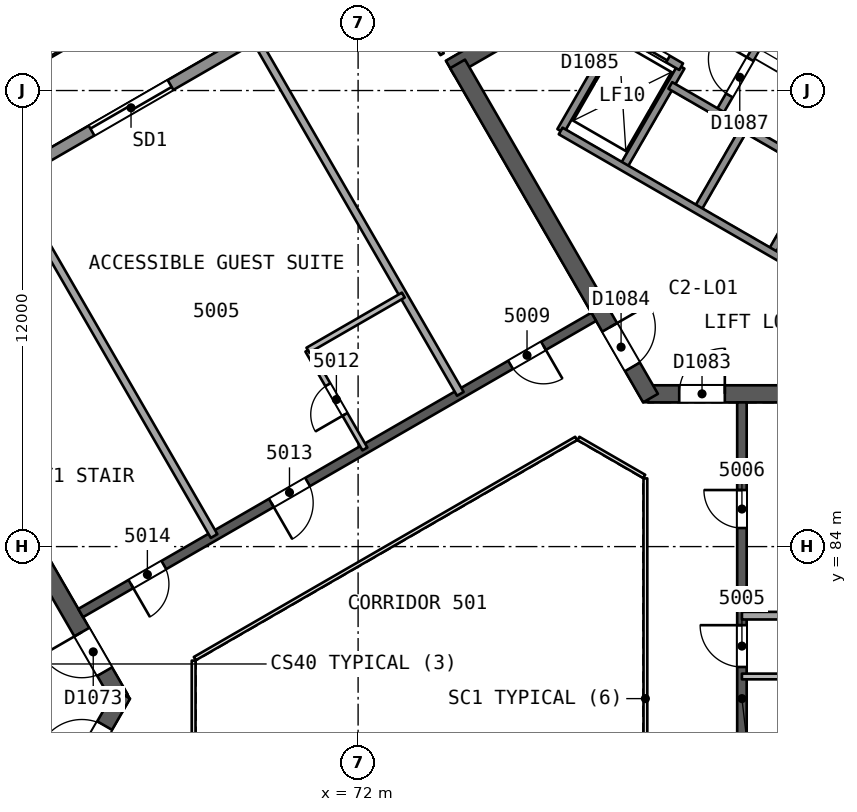
"""IFC4 building model, lengths in metres.
Left out: names, types, materials, properties, quantities, classifications, styles, units other than length and angle.
Written with IfcOpenShell. Run it as: python <this file> out.ifc"""

import sys

from ifc_helpers import new_model, si_unit, direction, frame, frame_2d, origin, place, context, subcontext, project, spatial, rectangle, extrude, element, fill, save


model = new_model("IFC4")
c1 = context("Model", 3, precision=1e-05, world=origin(), true_north=direction((0.0, 1.0)))
c2 = subcontext(c1, "Body", "Model", "MODEL_VIEW")
j1 = project(units=[si_unit("LENGTHUNIT", "METRE"), si_unit("PLANEANGLEUNIT", "RADIAN")], contexts=[c1])
p1 = place(None, origin())
s1 = spatial("IfcSite", under=j1, at=p1, CompositionType="ELEMENT")
p2 = place(p1, origin())
s2 = spatial("IfcBuilding", under=s1, at=p2, CompositionType="ELEMENT")
p3 = place(p2, frame((0.0, 0.0, 205.8)))
s3 = spatial("IfcBuildingStorey", under=s2, at=p3, CompositionType="ELEMENT", Elevation=205.8)
p4 = place(p3, frame((65.74, 80.0, 0.0), z_axis=(0.0, 0.0, 1.0), x_axis=(-0.499991857942, 0.866030104553, 0.0)))
e1 = element("IfcWall", 1, at=p4, inside=s3, PredefinedType="SHEAR", context=c2, shape_type="SweptSolid", body=[
    extrude(rectangle(XDim=10.25, YDim=0.45, at=frame_2d((5.125, 0.0))), origin(), (0.0, 0.0, 1.0), 3.7),
])
p5 = place(p4, frame((0.82, 0.0, 0.0)))
e2 = element("IfcOpeningElement", 2, at=p5, cuts=e1, PredefinedType="OPENING", context=c2, shape_type="SweptSolid", body=[
    extrude(rectangle(XDim=1.2, YDim=2.1, at=frame_2d((0.6, 1.05))), frame((0.0, 0.235, 0.0), z_axis=(0.0, -1.0, 0.0), x_axis=(1.0, 0.0, 0.0)), (0.0, 0.0, 1.0), 0.471),
])
p6 = place(p3, frame((60.728, 71.318, 0.0), z_axis=(0.0, 0.0, 1.0), x_axis=(0.500012416173, 0.866018235185, 0.0)))
e3 = element("IfcWall", 3, at=p6, inside=s3, PredefinedType="SHEAR", context=c2, shape_type="SweptSolid", body=[
    extrude(rectangle(XDim=10.155, YDim=0.45, at=frame_2d((5.078, 0.0))), origin(), (0.0, 0.0, 1.0), 3.7),
])
p7 = place(p6, frame((8.005, 0.0, 0.0)))
e4 = element("IfcOpeningElement", 4, at=p7, cuts=e3, PredefinedType="OPENING", context=c2, shape_type="SweptSolid", body=[
    extrude(rectangle(XDim=1.2, YDim=2.1, at=frame_2d((0.6, 1.05))), frame((0.0, 0.235, 0.0), z_axis=(0.0, -1.0, 0.0), x_axis=(1.0, 0.0, 0.0)), (0.0, 0.0, 1.0), 0.471),
])
p8 = place(p3, frame((79.63, 88.019, 0.0), z_axis=(0.0, 0.0, 1.0), x_axis=(1.0, 0.0, 0.0)))
e5 = element("IfcWall", 5, at=p8, inside=s3, PredefinedType="SHEAR", context=c2, shape_type="SweptSolid", body=[
    extrude(rectangle(XDim=10.25, YDim=0.45, at=frame_2d((5.125, 0.0))), origin(), (0.0, 0.0, 1.0), 3.7),
])
p9 = place(p8, frame((0.82, 0.0, 0.0)))
e6 = element("IfcOpeningElement", 6, at=p9, cuts=e5, PredefinedType="OPENING", context=c2, shape_type="SweptSolid", body=[
    extrude(rectangle(XDim=1.2, YDim=2.1, at=frame_2d((0.6, 1.05))), frame((0.0, 0.235, 0.0), z_axis=(0.0, -1.0, 0.0), x_axis=(1.0, 0.0, 0.0)), (0.0, 0.0, 1.0), 0.471),
])
p10 = place(p3, frame((86.723, 103.69, 0.0), z_axis=(0.0, 0.0, 1.0), x_axis=(-0.866022713978, -0.500004658852, 0.0)))
e7 = element("IfcWall", 7, at=p10, inside=s3, PredefinedType="SHEAR", context=c2, shape_type="SweptSolid", body=[
    extrude(rectangle(XDim=14.203, YDim=0.45, at=frame_2d((7.102, 0.0))), origin(), (0.0, 0.0, 1.0), 3.7),
])
p11 = place(p3, frame((74.617, 96.701, 0.0), z_axis=(0.0, 0.0, 1.0), x_axis=(0.499994385119, -0.866028645513, 0.0)))
e8 = element("IfcWall", 8, at=p11, inside=s3, PredefinedType="SHEAR", context=c2, shape_type="SweptSolid", body=[
    extrude(rectangle(XDim=10.155, YDim=0.45, at=frame_2d((5.077, 0.0))), origin(), (0.0, 0.0, 1.0), 3.7),
])
p12 = place(p11, frame((8.005, 0.0, 0.0)))
e9 = element("IfcOpeningElement", 9, at=p12, cuts=e8, PredefinedType="OPENING", context=c2, shape_type="SweptSolid", body=[
    extrude(rectangle(XDim=1.2, YDim=2.1, at=frame_2d((0.6, 1.05))), frame((0.0, 0.235, 0.0), z_axis=(0.0, -1.0, 0.0), x_axis=(1.0, 0.0, 0.0)), (0.0, 0.0, 1.0), 0.471),
])
p13 = place(p3, frame((82.1, 72.206, 0.0), z_axis=(0.0, 0.0, 1.0), x_axis=(0.0, 1.0, 0.0)))
e10 = element("IfcWall", 10, at=p13, inside=s3, PredefinedType="SHEAR", context=c2, shape_type="SweptSolid", body=[
    extrude(rectangle(XDim=15.588, YDim=0.25, at=frame_2d((7.794, 0.0))), origin(), (0.0, 0.0, 1.0), 3.3),
])
p14 = place(p13, frame((2.618, 0.0, 0.0)))
e11 = element("IfcOpeningElement", 11, at=p14, cuts=e10, PredefinedType="OPENING", context=c2, shape_type="SweptSolid", body=[
    extrude(rectangle(XDim=1.0, YDim=2.1, at=frame_2d((0.5, 1.05))), frame((0.0, 0.135, 0.0), z_axis=(0.0, -1.0, 0.0), x_axis=(1.0, 0.0, 0.0)), (0.0, 0.0, 1.0), 0.271),
])
p15 = place(p13, frame((8.627, 0.0, 0.0)))
e12 = element("IfcOpeningElement", 12, at=p15, cuts=e10, PredefinedType="OPENING", context=c2, shape_type="SweptSolid", body=[
    extrude(rectangle(XDim=1.1, YDim=2.1, at=frame_2d((0.55, 1.05))), frame((0.0, 0.135, 0.0), z_axis=(0.0, -1.0, 0.0), x_axis=(1.0, 0.0, 0.0)), (0.0, 0.0, 1.0), 0.271),
])
p16 = place(p13, frame((12.282, 0.0, 0.0)))
e13 = element("IfcOpeningElement", 13, at=p16, cuts=e10, PredefinedType="OPENING", context=c2, shape_type="SweptSolid", body=[
    extrude(rectangle(XDim=1.0, YDim=2.1, at=frame_2d((0.5, 1.05))), frame((0.0, 0.135, 0.0), z_axis=(0.0, -1.0, 0.0), x_axis=(1.0, 0.0, 0.0)), (0.0, 0.0, 1.0), 0.271),
])
p17 = place(p3, frame((78.2, 90.046, 0.0), z_axis=(0.0, 0.0, 1.0), x_axis=(-0.866026492143, -0.499998114903, 0.0)))
e14 = element("IfcWall", 14, at=p17, inside=s3, PredefinedType="SHEAR", context=c2, shape_type="SweptSolid", body=[
    extrude(rectangle(XDim=15.588, YDim=0.25, at=frame_2d((7.794, 0.0))), origin(), (0.0, 0.0, 1.0), 3.3),
])
p18 = place(p17, frame((1.527, 0.0, 0.0)))
e15 = element("IfcOpeningElement", 15, at=p18, cuts=e14, PredefinedType="OPENING", context=c2, shape_type="SweptSolid", body=[
    extrude(rectangle(XDim=1.0, YDim=2.1, at=frame_2d((0.5, 1.05))), frame((0.0, 0.135, 0.0), z_axis=(0.0, -1.0, 0.0), x_axis=(1.0, 0.0, 0.0)), (0.0, 0.0, 1.0), 0.271),
])
p19 = place(p17, frame((8.694, 0.0, 0.0)))
e16 = element("IfcOpeningElement", 16, at=p19, cuts=e14, PredefinedType="OPENING", context=c2, shape_type="SweptSolid", body=[
    extrude(rectangle(XDim=1.1, YDim=2.1, at=frame_2d((0.55, 1.05))), frame((0.0, 0.135, 0.0), z_axis=(0.0, -1.0, 0.0), x_axis=(1.0, 0.0, 0.0)), (0.0, 0.0, 1.0), 0.271),
])
p20 = place(p17, frame((13.062, 0.0, 0.0)))
e17 = element("IfcOpeningElement", 17, at=p20, cuts=e14, PredefinedType="OPENING", context=c2, shape_type="SweptSolid", body=[
    extrude(rectangle(XDim=1.0, YDim=2.1, at=frame_2d((0.5, 1.05))), frame((0.0, 0.135, 0.0), z_axis=(0.0, -1.0, 0.0), x_axis=(1.0, 0.0, 0.0)), (0.0, 0.0, 1.0), 0.271),
])
p21 = place(p3, frame((82.1, 80.582, 0.0), z_axis=(0.0, 0.0, 1.0), x_axis=(1.0, 0.0, 0.0)))
e18 = element("IfcWall", 18, at=p21, inside=s3, PredefinedType="PARTITIONING", context=c2, shape_type="SweptSolid", body=[
    extrude(rectangle(XDim=4.063, YDim=0.15, at=frame_2d((2.031, 0.0))), origin(), (0.0, 0.0, 1.0), 3.3),
])
p22 = place(p21, frame((1.582, 0.0, 0.0)))
e19 = element("IfcOpeningElement", 19, at=p22, cuts=e18, PredefinedType="OPENING", context=c2, shape_type="SweptSolid", body=[
    extrude(rectangle(XDim=0.9, YDim=2.1, at=frame_2d((0.45, 1.05))), frame((0.0, 0.085, 0.0), z_axis=(0.0, -1.0, 0.0), x_axis=(1.0, 0.0, 0.0)), (0.0, 0.0, 1.0), 0.171),
])
p23 = place(p3, frame((92.802, 82.182, 0.0), z_axis=(0.0, 0.0, 1.0), x_axis=(-1.0, 0.0, 0.0)))
e20 = element("IfcWall", 20, at=p23, inside=s3, PredefinedType="PARTITIONING", context=c2, shape_type="SweptSolid", body=[
    extrude(rectangle(XDim=10.702, YDim=0.2, at=frame_2d((5.351, 0.0))), origin(), (0.0, 0.0, 1.0), 3.3),
])
p24 = place(p3, frame((74.21, 96.956, 0.0), z_axis=(0.0, 0.0, 1.0), x_axis=(-0.499957886064, 0.866049716911, 0.0)))
e21 = element("IfcWall", 21, at=p24, inside=s3, PredefinedType="PARTITIONING", context=c2, shape_type="SweptSolid", body=[
    extrude(rectangle(XDim=2.723, YDim=0.1, at=frame_2d((1.361, 0.0))), origin(), (0.0, 0.0, 1.0), 3.3),
])
p25 = place(p24, frame((0.911, 0.0, 0.0)))
e22 = element("IfcOpeningElement", 22, at=p25, cuts=e21, PredefinedType="OPENING", context=c2, shape_type="SweptSolid", body=[
    extrude(rectangle(XDim=0.9, YDim=2.1, at=frame_2d((0.45, 1.05))), frame((0.0, 0.061, 0.0), z_axis=(0.0, -1.0, 0.0), x_axis=(1.0, 0.0, 0.0)), (0.0, 0.0, 1.0), 0.121),
])
p26 = place(p3, frame((69.339, 97.287, 0.0), z_axis=(0.0, 0.0, 1.0), x_axis=(0.499993653641, -0.866029067825, 0.0)))
e23 = element("IfcWall", 23, at=p26, inside=s3, PredefinedType="PARTITIONING", context=c2, shape_type="SweptSolid", body=[
    extrude(rectangle(XDim=10.702, YDim=0.2, at=frame_2d((5.351, 0.0))), origin(), (0.0, 0.0, 1.0), 3.3),
])
p27 = place(p3, frame((72.178, 86.569, 0.0), z_axis=(0.0, 0.0, 1.0), x_axis=(-0.499990139034, 0.866031096941, 0.0)))
e24 = element("IfcWall", 24, at=p27, inside=s3, PredefinedType="PARTITIONING", context=c2, shape_type="SweptSolid", body=[
    extrude(rectangle(XDim=3.0, YDim=0.15, at=frame_2d((1.5, 0.0))), origin(), (0.0, 0.0, 1.0), 3.3),
])
p28 = place(p27, frame((1.05, 0.0, 0.0)))
e25 = element("IfcOpeningElement", 25, at=p28, cuts=e24, PredefinedType="OPENING", context=c2, shape_type="SweptSolid", body=[
    extrude(rectangle(XDim=0.9, YDim=2.1, at=frame_2d((0.45, 1.05))), frame((0.0, 0.085, 0.0), z_axis=(0.0, -1.0, 0.0), x_axis=(1.0, 0.0, 0.0)), (0.0, 0.0, 1.0), 0.171),
])
p29 = place(p3, frame((70.678, 89.167, 0.0), z_axis=(0.0, 0.0, 1.0), x_axis=(0.866032775405, 0.499987231761, 0.0)))
e26 = element("IfcWall", 26, at=p29, inside=s3, PredefinedType="PARTITIONING", context=c2, shape_type="SweptSolid", body=[
    extrude(rectangle(XDim=2.9, YDim=0.15, at=frame_2d((1.45, 0.0))), origin(), (0.0, 0.0, 1.0), 3.3),
])
p30 = place(p3, frame((62.859, 93.546, 0.0), z_axis=(0.0, 0.0, 1.0), x_axis=(0.499993653641, -0.866029067825, 0.0)))
e27 = element("IfcWall", 27, at=p30, inside=s3, PredefinedType="PARTITIONING", context=c2, shape_type="SweptSolid", body=[
    extrude(rectangle(XDim=10.702, YDim=0.2, at=frame_2d((5.351, 0.0))), origin(), (0.0, 0.0, 1.0), 3.3),
])
p31 = place(p3, frame((43.672, 82.641, 0.0), z_axis=(0.0, 0.0, 1.0), x_axis=(0.866024917385, 0.500000842468, 0.0)))
e28 = element("IfcWall", 28, at=p31, inside=s3, PredefinedType="SOLIDWALL", context=c2, shape_type="SweptSolid", body=[
    extrude(rectangle(XDim=51.621, YDim=0.3, at=frame_2d((25.811, 0.0))), origin(), (0.0, 0.0, 1.0), 3.3),
])
p32 = place(p31, frame((24.611, 0.0, 0.0)))
e29 = element("IfcOpeningElement", 29, at=p32, cuts=e28, PredefinedType="OPENING", context=c2, shape_type="SweptSolid", body=[
    extrude(rectangle(XDim=2.4, YDim=2.4, at=frame_2d((1.2, 1.2))), frame((0.0, 0.161, 0.0), z_axis=(0.0, -1.0, 0.0), x_axis=(1.0, 0.0, 0.0)), (0.0, 0.0, 1.0), 0.321),
])
p33 = place(p31, frame((30.378, 0.0, 0.0)))
e30 = element("IfcOpeningElement", 30, at=p33, cuts=e28, PredefinedType="OPENING", context=c2, shape_type="SweptSolid", body=[
    extrude(rectangle(XDim=2.4, YDim=2.4, at=frame_2d((1.2, 1.2))), frame((0.0, 0.161, 0.0), z_axis=(0.0, -1.0, 0.0), x_axis=(1.0, 0.0, 0.0)), (0.0, 0.0, 1.0), 0.321),
])
p34 = place(p31, frame((40.147, 0.0, 0.0)))
e31 = element("IfcOpeningElement", 31, at=p34, cuts=e28, PredefinedType="OPENING", context=c2, shape_type="SweptSolid", body=[
    extrude(rectangle(XDim=2.4, YDim=2.4, at=frame_2d((1.2, 1.2))), frame((0.0, 0.161, 0.0), z_axis=(0.0, -1.0, 0.0), x_axis=(1.0, 0.0, 0.0)), (0.0, 0.0, 1.0), 0.321),
])
p35 = place(p31, frame((18.843, 0.0, 0.0)))
e32 = element("IfcOpeningElement", 32, at=p35, cuts=e28, PredefinedType="OPENING", context=c2, shape_type="SweptSolid", body=[
    extrude(rectangle(XDim=2.4, YDim=2.4, at=frame_2d((1.2, 1.2))), frame((0.0, 0.161, 0.0), z_axis=(0.0, -1.0, 0.0), x_axis=(1.0, 0.0, 0.0)), (0.0, 0.0, 1.0), 0.321),
])
p36 = place(p31, frame((9.107, 0.0, 0.0)))
e33 = element("IfcOpeningElement", 33, at=p36, cuts=e28, PredefinedType="OPENING", context=c2, shape_type="SweptSolid", body=[
    extrude(rectangle(XDim=2.4, YDim=2.4, at=frame_2d((1.2, 1.2))), frame((0.0, 0.161, 0.0), z_axis=(0.0, -1.0, 0.0), x_axis=(1.0, 0.0, 0.0)), (0.0, 0.0, 1.0), 0.321),
])
for number, where, z_axis, x_axis in (
    (34, (82.873, 91.736, 0.0), (0.0, 0.0, 1.0), (0.5, 0.866, 0.0)),
    (35, (80.924, 92.861, 0.0), (0.0, 0.0, 1.0), (0.5, 0.866, 0.0)),
):
    element("IfcWall", number, at=place(p3, frame(where, z_axis=z_axis, x_axis=x_axis)), inside=s3, PredefinedType="SOLIDWALL", context=c2, shape_type="SweptSolid", body=[
        extrude(rectangle(XDim=2.48, YDim=0.2, at=frame_2d((1.24, 0.0))), origin(), (0.0, 0.0, 1.0), 3.3),
    ])
p37 = place(p3, frame((81.493, 95.396, 0.0), z_axis=(0.0, 0.0, 1.0), x_axis=(0.500006057782, 0.866021906294, 0.0)))
e36 = element("IfcWall", 36, at=p37, inside=s3, PredefinedType="SOLIDWALL", context=c2, shape_type="SweptSolid", body=[
    extrude(rectangle(XDim=7.7, YDim=0.2, at=frame_2d((3.85, 0.0))), origin(), (0.0, 0.0, 1.0), 3.3),
])
p38 = place(p37, frame((0.55, 0.0, 0.0)))
e37 = element("IfcOpeningElement", 37, at=p38, cuts=e36, PredefinedType="OPENING", context=c2, shape_type="SweptSolid", body=[
    extrude(rectangle(XDim=1.1, YDim=2.1, at=frame_2d((0.55, 1.05))), frame((0.0, 0.11, 0.0), z_axis=(0.0, -1.0, 0.0), x_axis=(1.0, 0.0, 0.0)), (0.0, 0.0, 1.0), 0.221),
])
for number, where, z_axis, x_axis in (
    (38, (78.976, 93.986, 0.0), (0.0, 0.0, 1.0), (0.5, 0.866, 0.0)),
    (39, (77.33, 94.936, 0.0), (0.0, 0.0, 1.0), (0.5, 0.866, 0.0)),
):
    element("IfcWall", number, at=place(p3, frame(where, z_axis=z_axis, x_axis=x_axis)), inside=s3, PredefinedType="SOLIDWALL", context=c2, shape_type="SweptSolid", body=[
        extrude(rectangle(XDim=3.05, YDim=0.2, at=frame_2d((1.525, 0.0))), origin(), (0.0, 0.0, 1.0), 3.3),
    ])
p39 = place(p3, frame((86.77, 89.486, 0.0), z_axis=(0.0, 0.0, 1.0), x_axis=(-0.86601811187, 0.500012629753, 0.0)))
e40 = element("IfcWall", 40, at=p39, inside=s3, PredefinedType="SOLIDWALL", context=c2, shape_type="SweptSolid", body=[
    extrude(rectangle(XDim=10.9, YDim=0.2, at=frame_2d((5.45, 0.0))), origin(), (0.0, 0.0, 1.0), 3.3),
])
p40 = place(p3, frame((89.43, 90.814, 0.0), z_axis=(0.0, 0.0, 1.0), x_axis=(-0.866018983788, 0.500011119594, 0.0)))
e41 = element("IfcWall", 41, at=p40, inside=s3, PredefinedType="SOLIDWALL", context=c2, shape_type="SweptSolid", body=[
    extrude(rectangle(XDim=10.64, YDim=0.2, at=frame_2d((5.32, 0.0))), origin(), (0.0, 0.0, 1.0), 3.3),
])
p41 = place(p40, frame((0.37, 0.0, 0.0)))
e42 = element("IfcOpeningElement", 42, at=p41, cuts=e41, PredefinedType="OPENING", context=c2, shape_type="SweptSolid", body=[
    extrude(rectangle(XDim=0.9, YDim=2.1, at=frame_2d((0.45, 1.05))), frame((0.0, 0.11, 0.0), z_axis=(0.0, -1.0, 0.0), x_axis=(1.0, 0.0, 0.0)), (0.0, 0.0, 1.0), 0.221),
])
p42 = place(p3, frame((80.5, 96.627, 0.0), z_axis=(0.0, 0.0, 1.0), x_axis=(-0.86601224135, 0.500022797313, 0.0)))
e43 = element("IfcWall", 43, at=p42, inside=s3, PredefinedType="SOLIDWALL", context=c2, shape_type="SweptSolid", body=[
    extrude(rectangle(XDim=1.9, YDim=0.2, at=frame_2d((0.95, 0.0))), origin(), (0.0, 0.0, 1.0), 3.3),
])
p43 = place(p42, frame((0.4, 0.0, 0.0)))
e44 = element("IfcOpeningElement", 44, at=p43, cuts=e43, PredefinedType="OPENING", context=c2, shape_type="SweptSolid", body=[
    extrude(rectangle(XDim=1.1, YDim=2.1, at=frame_2d((0.55, 1.05))), frame((0.0, 0.11, 0.0), z_axis=(0.0, -1.0, 0.0), x_axis=(1.0, 0.0, 0.0)), (0.0, 0.0, 1.0), 0.221),
])
p44 = place(p3, frame((79.56, 74.206, 0.0), z_axis=(0.0, 0.0, 1.0), x_axis=(0.0, 1.0, 0.0)))
e45 = element("IfcWall", 45, at=p44, inside=s3, PredefinedType="PARTITIONING", context=c2, shape_type="SweptSolid", body=[
    extrude(rectangle(XDim=11.588, YDim=0.1, at=frame_2d((5.794, 0.0))), origin(), (0.0, 0.0, 1.0), 3.3),
])
p45 = place(p3, frame((79.53, 85.846, 0.0), z_axis=(0.0, 0.0, 1.0), x_axis=(-0.866041268327, 0.499972520799, 0.0)))
e46 = element("IfcWall", 46, at=p45, inside=s3, PredefinedType="PARTITIONING", context=c2, shape_type="SweptSolid", body=[
    extrude(rectangle(XDim=2.0, YDim=0.1, at=frame_2d((1.0, 0.0))), origin(), (0.0, 0.0, 1.0), 3.3),
])
p46 = place(p3, frame((77.738, 86.846, 0.0), z_axis=(0.0, 0.0, 1.0), x_axis=(-0.866026658274, -0.499997827154, 0.0)))
e47 = element("IfcWall", 47, at=p46, inside=s3, PredefinedType="PARTITIONING", context=c2, shape_type="SweptSolid", body=[
    extrude(rectangle(XDim=11.588, YDim=0.1, at=frame_2d((5.794, 0.0))), origin(), (0.0, 0.0, 1.0), 3.3),
])
p47 = place(p3, frame((67.672, 81.0, 0.0), z_axis=(0.0, 0.0, 1.0), x_axis=(0.0, -1.0, 0.0)))
e48 = element("IfcWall", 48, at=p47, inside=s3, PredefinedType="PARTITIONING", context=c2, shape_type="SweptSolid", body=[
    extrude(rectangle(XDim=2.0, YDim=0.1, at=frame_2d((1.0, 0.0))), origin(), (0.0, 0.0, 1.0), 3.3),
])
p48 = place(p15, origin())
e49 = element("IfcDoor", 49, at=p48, inside=s3, OperationType="SINGLE_SWING_RIGHT", PredefinedType="NOTDEFINED", context=c2, shape_type="SweptSolid", body=[
    extrude(rectangle(XDim=1.1, YDim=2.1, at=frame_2d((0.55, 1.05))), frame((0.0, 0.025, 0.0), z_axis=(0.0, -1.0, 0.0), x_axis=(1.0, 0.0, 0.0)), (0.0, 0.0, 1.0), 0.05),
])
fill(e12, e49)
p49 = place(p16, origin())
e50 = element("IfcDoor", 50, at=p49, inside=s3, OperationType="SINGLE_SWING_RIGHT", PredefinedType="NOTDEFINED", context=c2, shape_type="SweptSolid", body=[
    extrude(rectangle(XDim=1.0, YDim=2.1, at=frame_2d((0.5, 1.05))), frame((0.0, 0.025, 0.0), z_axis=(0.0, -1.0, 0.0), x_axis=(1.0, 0.0, 0.0)), (0.0, 0.0, 1.0), 0.05),
])
fill(e13, e50)
p50 = place(p18, origin())
e51 = element("IfcDoor", 51, at=p50, inside=s3, OperationType="SINGLE_SWING_LEFT", PredefinedType="NOTDEFINED", context=c2, shape_type="SweptSolid", body=[
    extrude(rectangle(XDim=1.0, YDim=2.1, at=frame_2d((0.5, 1.05))), frame((0.0, 0.025, 0.0), z_axis=(0.0, -1.0, 0.0), x_axis=(1.0, 0.0, 0.0)), (0.0, 0.0, 1.0), 0.05),
])
fill(e15, e51)
p51 = place(p28, origin())
e52 = element("IfcDoor", 52, at=p51, inside=s3, OperationType="SINGLE_SWING_LEFT", PredefinedType="NOTDEFINED", context=c2, shape_type="SweptSolid", body=[
    extrude(rectangle(XDim=0.9, YDim=2.1, at=frame_2d((0.45, 1.05))), frame((0.0, 0.025, 0.0), z_axis=(0.0, -1.0, 0.0), x_axis=(1.0, 0.0, 0.0)), (0.0, 0.0, 1.0), 0.05),
])
fill(e25, e52)
p52 = place(p19, origin())
e53 = element("IfcDoor", 53, at=p52, inside=s3, OperationType="SINGLE_SWING_RIGHT", PredefinedType="NOTDEFINED", context=c2, shape_type="SweptSolid", body=[
    extrude(rectangle(XDim=1.1, YDim=2.1, at=frame_2d((0.55, 1.05))), frame((0.0, 0.025, 0.0), z_axis=(0.0, -1.0, 0.0), x_axis=(1.0, 0.0, 0.0)), (0.0, 0.0, 1.0), 0.05),
])
fill(e16, e53)
p53 = place(p20, origin())
e54 = element("IfcDoor", 54, at=p53, inside=s3, OperationType="SINGLE_SWING_RIGHT", PredefinedType="NOTDEFINED", context=c2, shape_type="SweptSolid", body=[
    extrude(rectangle(XDim=1.0, YDim=2.1, at=frame_2d((0.5, 1.05))), frame((0.0, 0.025, 0.0), z_axis=(0.0, -1.0, 0.0), x_axis=(1.0, 0.0, 0.0)), (0.0, 0.0, 1.0), 0.05),
])
fill(e17, e54)
p54 = place(p32, origin())
e55 = element("IfcDoor", 55, at=p54, inside=s3, OperationType="SLIDING_TO_LEFT", PredefinedType="NOTDEFINED", context=c2, shape_type="SweptSolid", body=[
    extrude(rectangle(XDim=2.4, YDim=2.4, at=frame_2d((1.2, 1.2))), frame((0.0, 0.025, 0.0), z_axis=(0.0, -1.0, 0.0), x_axis=(1.0, 0.0, 0.0)), (0.0, 0.0, 1.0), 0.05),
])
fill(e29, e55)
p55 = place(p5, origin())
e56 = element("IfcDoor", 56, at=p55, inside=s3, OperationType="SINGLE_SWING_RIGHT", PredefinedType="NOTDEFINED", context=c2, shape_type="SweptSolid", body=[
    extrude(rectangle(XDim=1.2, YDim=2.1, at=frame_2d((0.6, 1.05))), frame((0.0, 0.025, 0.0), z_axis=(0.0, -1.0, 0.0), x_axis=(1.0, 0.0, 0.0)), (0.0, 0.0, 1.0), 0.05),
])
fill(e2, e56)
p56 = place(p7, origin())
e57 = element("IfcDoor", 57, at=p56, inside=s3, OperationType="SINGLE_SWING_LEFT", PredefinedType="NOTDEFINED", context=c2, shape_type="SweptSolid", body=[
    extrude(rectangle(XDim=1.2, YDim=2.1, at=frame_2d((0.6, 1.05))), frame((0.0, 0.025, 0.0), z_axis=(0.0, -1.0, 0.0), x_axis=(1.0, 0.0, 0.0)), (0.0, 0.0, 1.0), 0.05),
])
fill(e4, e57)
p57 = place(p9, origin())
e58 = element("IfcDoor", 58, at=p57, inside=s3, OperationType="SINGLE_SWING_RIGHT", PredefinedType="NOTDEFINED", context=c2, shape_type="SweptSolid", body=[
    extrude(rectangle(XDim=1.2, YDim=2.1, at=frame_2d((0.6, 1.05))), frame((0.0, 0.025, 0.0), z_axis=(0.0, -1.0, 0.0), x_axis=(1.0, 0.0, 0.0)), (0.0, 0.0, 1.0), 0.05),
])
fill(e6, e58)
p58 = place(p12, origin())
e59 = element("IfcDoor", 59, at=p58, inside=s3, OperationType="SINGLE_SWING_LEFT", PredefinedType="NOTDEFINED", context=c2, shape_type="SweptSolid", body=[
    extrude(rectangle(XDim=1.2, YDim=2.1, at=frame_2d((0.6, 1.05))), frame((0.0, 0.025, 0.0), z_axis=(0.0, -1.0, 0.0), x_axis=(1.0, 0.0, 0.0)), (0.0, 0.0, 1.0), 0.05),
])
fill(e9, e59)
p59 = place(p43, origin())
e60 = element("IfcDoor", 60, at=p59, inside=s3, OperationType="SLIDING_TO_RIGHT", PredefinedType="NOTDEFINED", context=c2, shape_type="SweptSolid", body=[
    extrude(rectangle(XDim=1.1, YDim=2.1, at=frame_2d((0.55, 1.05))), frame((0.0, 0.025, 0.0), z_axis=(0.0, -1.0, 0.0), x_axis=(1.0, 0.0, 0.0)), (0.0, 0.0, 1.0), 0.05),
])
fill(e44, e60)
p60 = place(p38, origin())
e61 = element("IfcDoor", 61, at=p60, inside=s3, OperationType="SINGLE_SWING_RIGHT", PredefinedType="NOTDEFINED", context=c2, shape_type="SweptSolid", body=[
    extrude(rectangle(XDim=1.1, YDim=2.1, at=frame_2d((0.55, 1.05))), frame((0.0, 0.025, 0.0), z_axis=(0.0, -1.0, 0.0), x_axis=(1.0, 0.0, 0.0)), (0.0, 0.0, 1.0), 0.05),
])
fill(e37, e61)
save(model, sys.argv[1])
